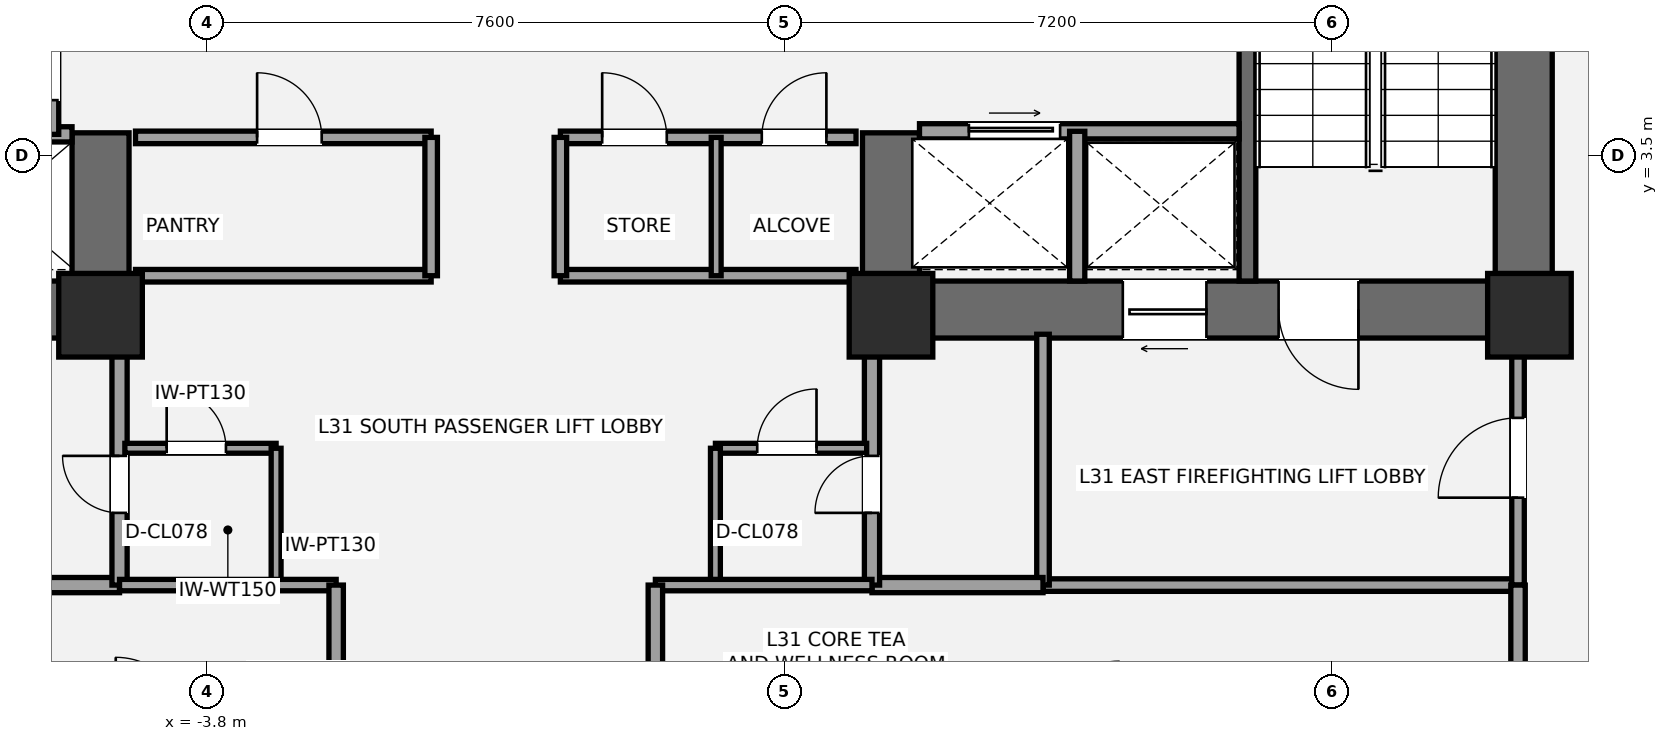
"""IFC4 building model, lengths in metres.
Left out: names, types, materials, properties, quantities, classifications, styles, units other than length and angle.
Written with IfcOpenShell. Run it as: python <this file> out.ifc"""

import sys

from ifc_helpers import new_model, si_unit, direction, frame, frame_2d, origin, origin_2d, place, context, subcontext, project, spatial, rectangle, extrude, element, fill, save


model = new_model("IFC4")
c1 = context("Model", 3, precision=1e-05, world=origin(), true_north=direction((0.0, 1.0)))
c2 = subcontext(c1, "Body", "Model", "MODEL_VIEW")
j1 = project(units=[si_unit("LENGTHUNIT", "METRE"), si_unit("PLANEANGLEUNIT", "RADIAN")], contexts=[c1])
p1 = place(None, origin())
s1 = spatial("IfcSite", under=j1, at=p1, CompositionType="ELEMENT")
p2 = place(p1, origin())
s2 = spatial("IfcBuilding", under=s1, at=p2, CompositionType="ELEMENT")
p3 = place(p2, frame((0.0, 0.0, 117.6)))
s3 = spatial("IfcBuildingStorey", under=s2, at=p3, CompositionType="ELEMENT", Elevation=117.6)
p4 = place(p3, frame((-4.825, 1.475, 0.0), z_axis=(0.0, 0.0, 1.0), x_axis=(-1.0, 0.0, 0.0)))
e1 = element("IfcWall", 1, at=p4, inside=s3, PredefinedType="SHEAR", context=c2, shape_type="SweptSolid", body=[
    extrude(rectangle(XDim=9.075, YDim=0.75, at=frame_2d((4.538, 0.0))), origin(), (0.0, 0.0, 1.0), 3.5),
])
p5 = place(p4, frame((5.475, 0.0, 0.0)))
e2 = element("IfcOpeningElement", 2, at=p5, cuts=e1, PredefinedType="OPENING", context=c2, shape_type="SweptSolid", body=[
    extrude(rectangle(XDim=1.05, YDim=2.15, at=frame_2d((0.525, 1.075))), frame((0.0, 0.385, 0.0), z_axis=(0.0, -1.0, 0.0), x_axis=(1.0, 0.0, 0.0)), (0.0, 0.0, 1.0), 0.77),
])
p6 = place(p4, frame((3.805, 0.0, 0.0)))
e3 = element("IfcOpeningElement", 3, at=p6, cuts=e1, PredefinedType="OPENING", context=c2, shape_type="SweptSolid", body=[
    extrude(rectangle(XDim=1.1, YDim=2.2, at=frame_2d((0.55, 1.1))), frame((0.0, 0.385, 0.0), z_axis=(0.0, -1.0, 0.0), x_axis=(1.0, 0.0, 0.0)), (0.0, 0.0, 1.0), 0.77),
])
p7 = place(p3, frame((-5.2, 1.1, 0.0), z_axis=(0.0, 0.0, 1.0), x_axis=(0.0, 1.0, 0.0)))
e4 = element("IfcWall", 4, at=p7, inside=s3, PredefinedType="SHEAR", context=c2, shape_type="SweptSolid", body=[
    extrude(rectangle(XDim=2.7, YDim=0.75, at=frame_2d((1.35, 0.0))), origin(), (0.0, 0.0, 1.0), 3.5),
])
p8 = place(p3, frame((13.525, 1.1, 0.0), z_axis=(0.0, 0.0, 1.0), x_axis=(0.0, 1.0, 0.0)))
e5 = element("IfcWall", 5, at=p8, inside=s3, PredefinedType="SHEAR", context=c2, shape_type="SweptSolid", body=[
    extrude(rectangle(XDim=8.65, YDim=0.75, at=frame_2d((4.325, 0.0))), origin(), (0.0, 0.0, 1.0), 3.5),
])
p9 = place(p3, frame((13.9, 1.475, 0.0), z_axis=(0.0, 0.0, 1.0), x_axis=(-1.0, 0.0, 0.0)))
e6 = element("IfcWall", 6, at=p9, inside=s3, PredefinedType="SHEAR", context=c2, shape_type="SweptSolid", body=[
    extrude(rectangle(XDim=9.075, YDim=0.75, at=frame_2d((4.538, 0.0))), origin(), (0.0, 0.0, 1.0), 3.5),
])
p10 = place(p9, frame((2.55, 0.0, 0.0)))
e7 = element("IfcOpeningElement", 7, at=p10, cuts=e6, PredefinedType="OPENING", context=c2, shape_type="SweptSolid", body=[
    extrude(rectangle(XDim=1.05, YDim=2.15, at=frame_2d((0.525, 1.075))), frame((0.0, 0.385, 0.0), z_axis=(0.0, -1.0, 0.0), x_axis=(1.0, 0.0, 0.0)), (0.0, 0.0, 1.0), 0.77),
])
p11 = place(p9, frame((4.55, 0.0, 0.0)))
e8 = element("IfcOpeningElement", 8, at=p11, cuts=e6, PredefinedType="OPENING", context=c2, shape_type="SweptSolid", body=[
    extrude(rectangle(XDim=1.1, YDim=2.2, at=frame_2d((0.55, 1.1))), frame((0.0, 0.385, 0.0), z_axis=(0.0, -1.0, 0.0), x_axis=(1.0, 0.0, 0.0)), (0.0, 0.0, 1.0), 0.77),
])
p12 = place(p3, frame((5.2, 1.1, 0.0), z_axis=(0.0, 0.0, 1.0), x_axis=(0.0, 1.0, 0.0)))
e9 = element("IfcWall", 9, at=p12, inside=s3, PredefinedType="SHEAR", context=c2, shape_type="SweptSolid", body=[
    extrude(rectangle(XDim=2.7, YDim=0.75, at=frame_2d((1.35, 0.0))), origin(), (0.0, 0.0, 1.0), 3.5),
])
p13 = place(p3, frame((9.89, 1.85, 0.0), z_axis=(0.0, 0.0, 1.0), x_axis=(0.0, 1.0, 0.0)))
e10 = element("IfcWall", 10, at=p13, inside=s3, PredefinedType="SHEAR", context=c2, shape_type="SweptSolid", body=[
    extrude(rectangle(XDim=7.15, YDim=0.22, at=frame_2d((3.575, 0.0))), origin(), (0.0, 0.0, 1.0), 3.5),
])
for number, where, z_axis, x_axis in (
    (11, (-5.2, 1.4, 0.0), (0.0, 0.0, 1.0), (1.0, 0.0, 0.0)),
    (12, (5.2, 1.4, 0.0), (0.0, 0.0, 1.0), (1.0, 0.0, 0.0)),
    (13, (13.6, 1.4, 0.0), (0.0, 0.0, 1.0), (1.0, 0.0, 0.0)),
):
    element("IfcColumn", number, at=place(p3, frame(where, z_axis=z_axis, x_axis=x_axis)), inside=s3, PredefinedType="COLUMN", context=c2, shape_type="SweptSolid", body=[
        extrude(rectangle(XDim=1.1, YDim=1.1, at=origin_2d()), origin(), (0.0, 0.0, 1.0), 3.5),
    ])
p14 = place(p3, frame((-7.2, -2.15, 0.0), z_axis=(0.0, 0.0, 1.0), x_axis=(1.0, 0.0, 0.0)))
e14 = element("IfcWall", 14, at=p14, inside=s3, PredefinedType="SOLIDWALL", context=c2, shape_type="SweptSolid", body=[
    extrude(rectangle(XDim=2.25, YDim=0.2, at=frame_2d((1.125, 0.0))), origin(), (0.0, 0.0, 1.0), 2.763),
])
p15 = place(p3, frame((-4.95, -2.15, 0.0), z_axis=(0.0, 0.0, 1.0), x_axis=(0.0, 1.0, 0.0)))
e15 = element("IfcWall", 15, at=p15, inside=s3, PredefinedType="SOLIDWALL", context=c2, shape_type="SweptSolid", body=[
    extrude(rectangle(XDim=3.3, YDim=0.2, at=frame_2d((1.65, 0.0))), origin(), (0.0, 0.0, 1.0), 2.763),
])
p16 = place(p15, frame((0.95, 0.0, 0.0)))
e16 = element("IfcOpeningElement", 16, at=p16, cuts=e15, PredefinedType="OPENING", context=c2, shape_type="SweptSolid", body=[
    extrude(rectangle(XDim=0.75, YDim=2.1, at=frame_2d((0.375, 1.05))), frame((0.0, 0.11, 0.0), z_axis=(0.0, -1.0, 0.0), x_axis=(1.0, 0.0, 0.0)), (0.0, 0.0, 1.0), 0.22),
])
p17 = place(p3, frame((7.2, -2.15, 0.0), z_axis=(0.0, 0.0, 1.0), x_axis=(1.0, 0.0, 0.0)))
e17 = element("IfcWall", 17, at=p17, inside=s3, PredefinedType="PARTITIONING", context=c2, shape_type="SweptSolid", body=[
    extrude(rectangle(XDim=6.25, YDim=0.165, at=frame_2d((3.125, 0.0))), origin(), (0.0, 0.0, 1.0), 3.31),
])
p18 = place(p3, frame((7.2, -2.15, 0.0), z_axis=(0.0, 0.0, 1.0), x_axis=(0.0, 1.0, 0.0)))
e18 = element("IfcWall", 18, at=p18, inside=s3, PredefinedType="PARTITIONING", context=c2, shape_type="SweptSolid", body=[
    extrude(rectangle(XDim=3.3, YDim=0.165, at=frame_2d((1.65, 0.0))), origin(), (0.0, 0.0, 1.0), 2.763),
])
p19 = place(p3, frame((13.45, -2.15, 0.0), z_axis=(0.0, 0.0, 1.0), x_axis=(0.0, 1.0, 0.0)))
e19 = element("IfcWall", 19, at=p19, inside=s3, PredefinedType="PARTITIONING", context=c2, shape_type="SweptSolid", body=[
    extrude(rectangle(XDim=3.3, YDim=0.165, at=frame_2d((1.65, 0.0))), origin(), (0.0, 0.0, 1.0), 2.763),
])
p20 = place(p19, frame((1.15, 0.0, 0.0)))
e20 = element("IfcOpeningElement", 20, at=p20, cuts=e19, PredefinedType="OPENING", context=c2, shape_type="SweptSolid", body=[
    extrude(rectangle(XDim=1.05, YDim=2.15, at=frame_2d((0.525, 1.075))), frame((0.0, 0.093, 0.0), z_axis=(0.0, -1.0, 0.0), x_axis=(1.0, 0.0, 0.0)), (0.0, 0.0, 1.0), 0.185),
])
p21 = place(p3, frame((4.95, -2.15, 0.0), z_axis=(0.0, 0.0, 1.0), x_axis=(1.0, 0.0, 0.0)))
e21 = element("IfcWall", 21, at=p21, inside=s3, PredefinedType="SOLIDWALL", context=c2, shape_type="SweptSolid", body=[
    extrude(rectangle(XDim=2.25, YDim=0.2, at=frame_2d((1.125, 0.0))), origin(), (0.0, 0.0, 1.0), 3.31),
])
p22 = place(p3, frame((4.95, -2.15, 0.0), z_axis=(0.0, 0.0, 1.0), x_axis=(0.0, 1.0, 0.0)))
e22 = element("IfcWall", 22, at=p22, inside=s3, PredefinedType="SOLIDWALL", context=c2, shape_type="SweptSolid", body=[
    extrude(rectangle(XDim=3.3, YDim=0.2, at=frame_2d((1.65, 0.0))), origin(), (0.0, 0.0, 1.0), 2.763),
])
p23 = place(p22, frame((0.95, 0.0, 0.0)))
e23 = element("IfcOpeningElement", 23, at=p23, cuts=e22, PredefinedType="OPENING", context=c2, shape_type="SweptSolid", body=[
    extrude(rectangle(XDim=0.75, YDim=2.1, at=frame_2d((0.375, 1.05))), frame((0.0, 0.11, 0.0), z_axis=(0.0, -1.0, 0.0), x_axis=(1.0, 0.0, 0.0)), (0.0, 0.0, 1.0), 0.22),
])
p24 = place(p3, frame((-4.88, -0.35, 0.0), z_axis=(0.0, 0.0, 1.0), x_axis=(1.0, 0.0, 0.0)))
e24 = element("IfcWall", 24, at=p24, inside=s3, PredefinedType="PARTITIONING", context=c2, shape_type="SweptSolid", body=[
    extrude(rectangle(XDim=1.99, YDim=0.13, at=frame_2d((0.995, 0.0))), origin(), (0.0, 0.0, 1.0), 3.31),
])
p25 = place(p24, frame((0.55, 0.0, 0.0)))
e25 = element("IfcOpeningElement", 25, at=p25, cuts=e24, PredefinedType="OPENING", context=c2, shape_type="SweptSolid", body=[
    extrude(rectangle(XDim=0.78, YDim=2.1, at=frame_2d((0.39, 1.05))), frame((0.0, 0.075, 0.0), z_axis=(0.0, -1.0, 0.0), x_axis=(1.0, 0.0, 0.0)), (0.0, 0.0, 1.0), 0.15),
])
p26 = place(p3, frame((-2.89, -2.15, 0.0), z_axis=(0.0, 0.0, 1.0), x_axis=(0.0, 1.0, 0.0)))
e26 = element("IfcWall", 26, at=p26, inside=s3, PredefinedType="PARTITIONING", context=c2, shape_type="SweptSolid", body=[
    extrude(rectangle(XDim=1.8, YDim=0.13, at=frame_2d((0.9, 0.0))), origin(), (0.0, 0.0, 1.0), 3.31),
])
p27 = place(p3, frame((2.89, -0.35, 0.0), z_axis=(0.0, 0.0, 1.0), x_axis=(1.0, 0.0, 0.0)))
e27 = element("IfcWall", 27, at=p27, inside=s3, PredefinedType="PARTITIONING", context=c2, shape_type="SweptSolid", body=[
    extrude(rectangle(XDim=1.99, YDim=0.13, at=frame_2d((0.995, 0.0))), origin(), (0.0, 0.0, 1.0), 3.31),
])
p28 = place(p27, frame((0.55, 0.0, 0.0)))
e28 = element("IfcOpeningElement", 28, at=p28, cuts=e27, PredefinedType="OPENING", context=c2, shape_type="SweptSolid", body=[
    extrude(rectangle(XDim=0.78, YDim=2.1, at=frame_2d((0.39, 1.05))), frame((0.0, 0.075, 0.0), z_axis=(0.0, -1.0, 0.0), x_axis=(1.0, 0.0, 0.0)), (0.0, 0.0, 1.0), 0.15),
])
p29 = place(p3, frame((2.89, -2.15, 0.0), z_axis=(0.0, 0.0, 1.0), x_axis=(0.0, 1.0, 0.0)))
e29 = element("IfcWall", 29, at=p29, inside=s3, PredefinedType="PARTITIONING", context=c2, shape_type="SweptSolid", body=[
    extrude(rectangle(XDim=1.8, YDim=0.13, at=frame_2d((0.9, 0.0))), origin(), (0.0, 0.0, 1.0), 3.31),
])
p30 = place(p3, frame((-9.78, 3.78, 0.0), z_axis=(0.0, 0.0, 1.0), x_axis=(1.0, 0.0, 0.0)))
e30 = element("IfcWall", 30, at=p30, inside=s3, PredefinedType="SOLIDWALL", context=c2, shape_type="SweptSolid", body=[
    extrude(rectangle(XDim=4.205, YDim=0.2, at=frame_2d((2.103, 0.0))), origin(), (0.0, 0.0, 1.0), 3.31),
])
p31 = place(p3, frame((-5.85, 3.78, 0.0), z_axis=(0.0, 0.0, 1.0), x_axis=(0.0, 1.0, 0.0)))
e31 = element("IfcWall", 31, at=p31, inside=s3, PredefinedType="SOLIDWALL", context=c2, shape_type="SweptSolid", body=[
    extrude(rectangle(XDim=1.69, YDim=0.2, at=frame_2d((0.845, 0.0))), origin(), (0.0, 0.0, 1.0), 3.31),
])
p32 = place(p31, frame((0.45, 0.0, 0.0)))
e32 = element("IfcOpeningElement", 32, at=p32, cuts=e31, PredefinedType="OPENING", context=c2, shape_type="SweptSolid", body=[
    extrude(rectangle(XDim=0.75, YDim=2.1, at=frame_2d((0.375, 1.05))), frame((0.0, 0.11, 0.0), z_axis=(0.0, -1.0, 0.0), x_axis=(1.0, 0.0, 0.0)), (0.0, 0.0, 1.0), 0.22),
])
p33 = place(p3, frame((5.575, 3.82, 0.0), z_axis=(0.0, 0.0, 1.0), x_axis=(1.0, 0.0, 0.0)))
e33 = element("IfcWall", 33, at=p33, inside=s3, PredefinedType="SOLIDWALL", context=c2, shape_type="SweptSolid", body=[
    extrude(rectangle(XDim=4.205, YDim=0.2, at=frame_2d((2.103, 0.0))), origin(), (0.0, 0.0, 1.0), 3.31),
])
p34 = place(p33, frame((0.65, 0.0, 0.0)))
e34 = element("IfcOpeningElement", 34, at=p34, cuts=e33, PredefinedType="OPENING", context=c2, shape_type="SweptSolid", body=[
    extrude(rectangle(XDim=1.2, YDim=2.2, at=frame_2d((0.6, 1.1))), frame((0.0, 0.11, 0.0), z_axis=(0.0, -1.0, 0.0), x_axis=(1.0, 0.0, 0.0)), (0.0, 0.0, 1.0), 0.22),
])
p35 = place(p3, frame((7.65, 1.85, 0.0), z_axis=(0.0, 0.0, 1.0), x_axis=(0.0, 1.0, 0.0)))
e35 = element("IfcWall", 35, at=p35, inside=s3, PredefinedType="SOLIDWALL", context=c2, shape_type="SweptSolid", body=[
    extrude(rectangle(XDim=1.97, YDim=0.2, at=frame_2d((0.985, 0.0))), origin(), (0.0, 0.0, 1.0), 3.31),
])
p36 = place(p3, frame((-4.74, 1.92, 0.0), z_axis=(0.0, 0.0, 1.0), x_axis=(1.0, 0.0, 0.0)))
e36 = element("IfcWall", 36, at=p36, inside=s3, PredefinedType="PARTITIONING", context=c2, shape_type="SweptSolid", body=[
    extrude(rectangle(XDim=3.89, YDim=0.165, at=frame_2d((1.945, 0.0))), origin(), (0.0, 0.0, 1.0), 2.3),
])
p37 = place(p3, frame((-4.74, 3.74, 0.0), z_axis=(0.0, 0.0, 1.0), x_axis=(1.0, 0.0, 0.0)))
e37 = element("IfcWall", 37, at=p37, inside=s3, PredefinedType="PARTITIONING", context=c2, shape_type="SweptSolid", body=[
    extrude(rectangle(XDim=3.89, YDim=0.165, at=frame_2d((1.945, 0.0))), origin(), (0.0, 0.0, 1.0), 3.31),
])
p38 = place(p37, frame((1.6, 0.0, 0.0)))
e38 = element("IfcOpeningElement", 38, at=p38, cuts=e37, PredefinedType="OPENING", context=c2, shape_type="SweptSolid", body=[
    extrude(rectangle(XDim=0.85, YDim=2.1, at=frame_2d((0.425, 1.05))), frame((0.0, 0.093, 0.0), z_axis=(0.0, -1.0, 0.0), x_axis=(1.0, 0.0, 0.0)), (0.0, 0.0, 1.0), 0.185),
])
p39 = place(p3, frame((-0.85, 1.92, 0.0), z_axis=(0.0, 0.0, 1.0), x_axis=(0.0, 1.0, 0.0)))
e39 = element("IfcWall", 39, at=p39, inside=s3, PredefinedType="PARTITIONING", context=c2, shape_type="SweptSolid", body=[
    extrude(rectangle(XDim=1.82, YDim=0.165, at=frame_2d((0.91, 0.0))), origin(), (0.0, 0.0, 1.0), 3.31),
])
p40 = place(p3, frame((0.85, 1.92, 0.0), z_axis=(0.0, 0.0, 1.0), x_axis=(1.0, 0.0, 0.0)))
e40 = element("IfcWall", 40, at=p40, inside=s3, PredefinedType="PARTITIONING", context=c2, shape_type="SweptSolid", body=[
    extrude(rectangle(XDim=3.89, YDim=0.165, at=frame_2d((1.945, 0.0))), origin(), (0.0, 0.0, 1.0), 2.3),
])
p41 = place(p3, frame((0.85, 3.74, 0.0), z_axis=(0.0, 0.0, 1.0), x_axis=(1.0, 0.0, 0.0)))
e41 = element("IfcWall", 41, at=p41, inside=s3, PredefinedType="PARTITIONING", context=c2, shape_type="SweptSolid", body=[
    extrude(rectangle(XDim=3.89, YDim=0.165, at=frame_2d((1.945, 0.0))), origin(), (0.0, 0.0, 1.0), 3.31),
])
p42 = place(p41, frame((0.55, 0.0, 0.0)))
e42 = element("IfcOpeningElement", 42, at=p42, cuts=e41, PredefinedType="OPENING", context=c2, shape_type="SweptSolid", body=[
    extrude(rectangle(XDim=0.85, YDim=2.1, at=frame_2d((0.425, 1.05))), frame((0.0, 0.093, 0.0), z_axis=(0.0, -1.0, 0.0), x_axis=(1.0, 0.0, 0.0)), (0.0, 0.0, 1.0), 0.185),
])
p43 = place(p41, frame((2.65, 0.0, 0.0)))
e43 = element("IfcOpeningElement", 43, at=p43, cuts=e41, PredefinedType="OPENING", context=c2, shape_type="SweptSolid", body=[
    extrude(rectangle(XDim=0.85, YDim=2.1, at=frame_2d((0.425, 1.05))), frame((0.0, 0.093, 0.0), z_axis=(0.0, -1.0, 0.0), x_axis=(1.0, 0.0, 0.0)), (0.0, 0.0, 1.0), 0.185),
])
p44 = place(p3, frame((0.85, 1.92, 0.0), z_axis=(0.0, 0.0, 1.0), x_axis=(0.0, 1.0, 0.0)))
e44 = element("IfcWall", 44, at=p44, inside=s3, PredefinedType="PARTITIONING", context=c2, shape_type="SweptSolid", body=[
    extrude(rectangle(XDim=1.82, YDim=0.165, at=frame_2d((0.91, 0.0))), origin(), (0.0, 0.0, 1.0), 3.31),
])
p45 = place(p3, frame((2.9, 1.92, 0.0), z_axis=(0.0, 0.0, 1.0), x_axis=(0.0, 1.0, 0.0)))
e45 = element("IfcWall", 45, at=p45, inside=s3, PredefinedType="PARTITIONING", context=c2, shape_type="SweptSolid", body=[
    extrude(rectangle(XDim=1.82, YDim=0.13, at=frame_2d((0.91, 0.0))), origin(), (0.0, 0.0, 1.0), 3.31),
])
p46 = place(p3, frame((-4.95, -2.15, 0.0), z_axis=(0.0, 0.0, 1.0), x_axis=(1.0, 0.0, 0.0)))
e46 = element("IfcWall", 46, at=p46, inside=s3, PredefinedType="PLUMBINGWALL", context=c2, shape_type="SweptSolid", body=[
    extrude(rectangle(XDim=2.85, YDim=0.15, at=frame_2d((1.425, 0.0))), origin(), (0.0, 0.0, 1.0), 2.763),
])
p47 = place(p3, frame((-2.1, -4.05, 0.0), z_axis=(0.0, 0.0, 1.0), x_axis=(0.0, 1.0, 0.0)))
e47 = element("IfcWall", 47, at=p47, inside=s3, PredefinedType="PLUMBINGWALL", context=c2, shape_type="SweptSolid", body=[
    extrude(rectangle(XDim=1.9, YDim=0.19, at=frame_2d((0.95, 0.0))), origin(), (0.0, 0.0, 1.0), 3.31),
])
p48 = place(p3, frame((2.1, -2.15, 0.0), z_axis=(0.0, 0.0, 1.0), x_axis=(1.0, 0.0, 0.0)))
e48 = element("IfcWall", 48, at=p48, inside=s3, PredefinedType="PLUMBINGWALL", context=c2, shape_type="SweptSolid", body=[
    extrude(rectangle(XDim=2.85, YDim=0.15, at=frame_2d((1.425, 0.0))), origin(), (0.0, 0.0, 1.0), 3.31),
])
for number, where, z_axis, x_axis in (
    (49, (2.1, -4.05, 0.0), (0.0, 0.0, 1.0), (0.0, 1.0, 0.0)),
    (50, (13.45, -4.05, 0.0), (0.0, 0.0, 1.0), (0.0, 1.0, 0.0)),
):
    element("IfcWall", number, at=place(p3, frame(where, z_axis=z_axis, x_axis=x_axis)), inside=s3, PredefinedType="PLUMBINGWALL", context=c2, shape_type="SweptSolid", body=[
        extrude(rectangle(XDim=1.9, YDim=0.19, at=frame_2d((0.95, 0.0))), origin(), (0.0, 0.0, 1.0), 3.31),
    ])
p49 = place(p10, origin())
e51 = element("IfcDoor", 51, at=p49, inside=s3, OperationType="SINGLE_SWING_LEFT", PredefinedType="DOOR", context=c2, shape_type="SweptSolid", body=[
    extrude(rectangle(XDim=1.05, YDim=2.15, at=frame_2d((0.525, 1.075))), frame((0.0, 0.025, 0.0), z_axis=(0.0, -1.0, 0.0), x_axis=(1.0, 0.0, 0.0)), (0.0, 0.0, 1.0), 0.05),
])
fill(e7, e51)
p50 = place(p16, origin())
e52 = element("IfcDoor", 52, at=p50, inside=s3, OperationType="SINGLE_SWING_RIGHT", PredefinedType="DOOR", context=c2, shape_type="SweptSolid", body=[
    extrude(rectangle(XDim=0.75, YDim=2.1, at=frame_2d((0.375, 1.05))), frame((0.0, 0.025, 0.0), z_axis=(0.0, -1.0, 0.0), x_axis=(1.0, 0.0, 0.0)), (0.0, 0.0, 1.0), 0.05),
])
fill(e16, e52)
p51 = place(p20, origin())
e53 = element("IfcDoor", 53, at=p51, inside=s3, OperationType="SINGLE_SWING_LEFT", PredefinedType="DOOR", context=c2, shape_type="SweptSolid", body=[
    extrude(rectangle(XDim=1.05, YDim=2.15, at=frame_2d((0.525, 1.075))), frame((0.0, 0.025, 0.0), z_axis=(0.0, -1.0, 0.0), x_axis=(1.0, 0.0, 0.0)), (0.0, 0.0, 1.0), 0.05),
])
fill(e20, e53)
p52 = place(p23, origin())
e54 = element("IfcDoor", 54, at=p52, inside=s3, OperationType="SINGLE_SWING_LEFT", PredefinedType="DOOR", context=c2, shape_type="SweptSolid", body=[
    extrude(rectangle(XDim=0.75, YDim=2.1, at=frame_2d((0.375, 1.05))), frame((0.0, 0.025, 0.0), z_axis=(0.0, -1.0, 0.0), x_axis=(1.0, 0.0, 0.0)), (0.0, 0.0, 1.0), 0.05),
])
fill(e23, e54)
p53 = place(p25, origin())
e55 = element("IfcDoor", 55, at=p53, inside=s3, OperationType="SINGLE_SWING_LEFT", PredefinedType="DOOR", context=c2, shape_type="SweptSolid", body=[
    extrude(rectangle(XDim=0.78, YDim=2.1, at=frame_2d((0.39, 1.05))), frame((0.0, 0.025, 0.0), z_axis=(0.0, -1.0, 0.0), x_axis=(1.0, 0.0, 0.0)), (0.0, 0.0, 1.0), 0.05),
])
fill(e25, e55)
p54 = place(p28, origin())
e56 = element("IfcDoor", 56, at=p54, inside=s3, OperationType="SINGLE_SWING_RIGHT", PredefinedType="DOOR", context=c2, shape_type="SweptSolid", body=[
    extrude(rectangle(XDim=0.78, YDim=2.1, at=frame_2d((0.39, 1.05))), frame((0.0, 0.025, 0.0), z_axis=(0.0, -1.0, 0.0), x_axis=(1.0, 0.0, 0.0)), (0.0, 0.0, 1.0), 0.05),
])
fill(e28, e56)
p55 = place(p32, origin())
e57 = element("IfcDoor", 57, at=p55, inside=s3, OperationType="SINGLE_SWING_RIGHT", PredefinedType="DOOR", context=c2, shape_type="SweptSolid", body=[
    extrude(rectangle(XDim=0.75, YDim=2.1, at=frame_2d((0.375, 1.05))), frame((0.0, 0.025, 0.0), z_axis=(0.0, -1.0, 0.0), x_axis=(1.0, 0.0, 0.0)), (0.0, 0.0, 1.0), 0.05),
])
fill(e32, e57)
p56 = place(p11, origin())
e58 = element("IfcDoor", 58, at=p56, inside=s3, OperationType="SLIDING_TO_LEFT", PredefinedType="DOOR", context=c2, shape_type="SweptSolid", body=[
    extrude(rectangle(XDim=1.1, YDim=2.2, at=frame_2d((0.55, 1.1))), frame((0.0, 0.025, 0.0), z_axis=(0.0, -1.0, 0.0), x_axis=(1.0, 0.0, 0.0)), (0.0, 0.0, 1.0), 0.05),
])
fill(e8, e58)
p57 = place(p34, origin())
e59 = element("IfcDoor", 59, at=p57, inside=s3, OperationType="SLIDING_TO_RIGHT", PredefinedType="DOOR", context=c2, shape_type="SweptSolid", body=[
    extrude(rectangle(XDim=1.2, YDim=2.2, at=frame_2d((0.6, 1.1))), frame((0.0, 0.025, 0.0), z_axis=(0.0, -1.0, 0.0), x_axis=(1.0, 0.0, 0.0)), (0.0, 0.0, 1.0), 0.05),
])
fill(e34, e59)
p58 = place(p38, origin())
e60 = element("IfcDoor", 60, at=p58, inside=s3, OperationType="SINGLE_SWING_LEFT", PredefinedType="DOOR", context=c2, shape_type="SweptSolid", body=[
    extrude(rectangle(XDim=0.85, YDim=2.1, at=frame_2d((0.425, 1.05))), frame((0.0, 0.025, 0.0), z_axis=(0.0, -1.0, 0.0), x_axis=(1.0, 0.0, 0.0)), (0.0, 0.0, 1.0), 0.05),
])
fill(e38, e60)
p59 = place(p42, origin())
e61 = element("IfcDoor", 61, at=p59, inside=s3, OperationType="SINGLE_SWING_LEFT", PredefinedType="DOOR", context=c2, shape_type="SweptSolid", body=[
    extrude(rectangle(XDim=0.85, YDim=2.1, at=frame_2d((0.425, 1.05))), frame((0.0, 0.025, 0.0), z_axis=(0.0, -1.0, 0.0), x_axis=(1.0, 0.0, 0.0)), (0.0, 0.0, 1.0), 0.05),
])
fill(e42, e61)
p60 = place(p43, origin())
e62 = element("IfcDoor", 62, at=p60, inside=s3, OperationType="SINGLE_SWING_RIGHT", PredefinedType="DOOR", context=c2, shape_type="SweptSolid", body=[
    extrude(rectangle(XDim=0.85, YDim=2.1, at=frame_2d((0.425, 1.05))), frame((0.0, 0.025, 0.0), z_axis=(0.0, -1.0, 0.0), x_axis=(1.0, 0.0, 0.0)), (0.0, 0.0, 1.0), 0.05),
])
fill(e43, e62)
save(model, sys.argv[1])
